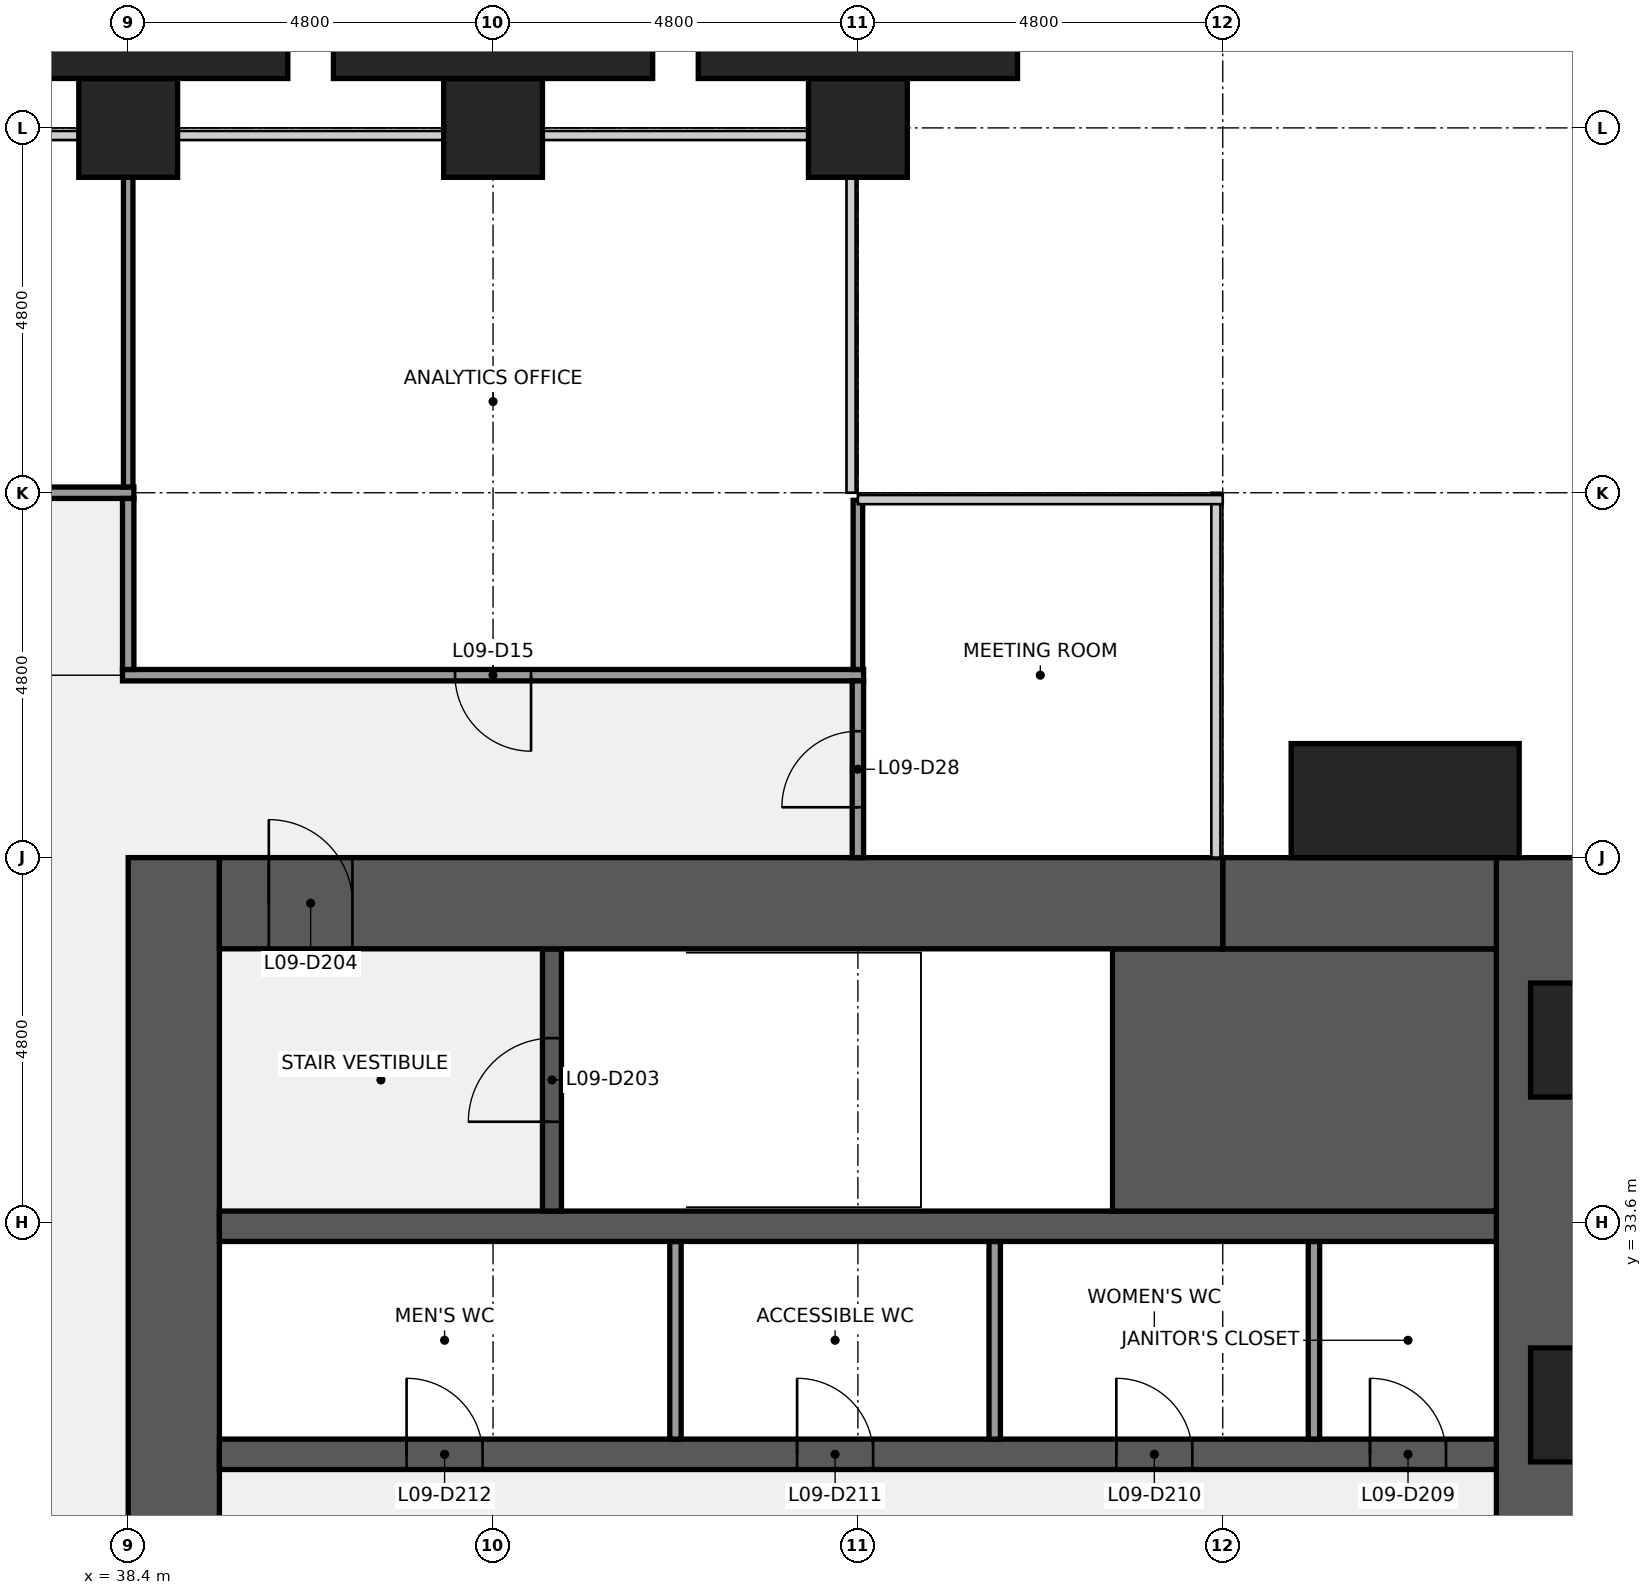
"""IFC4 building model, lengths in metres.
Left out: names, types, materials, properties, quantities, classifications, styles, units other than length and angle.
Written with IfcOpenShell. Run it as: python <this file> out.ifc"""

import sys

from ifc_helpers import new_model, si_unit, direction, frame, frame_2d, origin, origin_2d, place, context, subcontext, project, spatial, rectangle, extrude, element, fill, save


model = new_model("IFC4")
c1 = context("Model", 3, precision=1e-05, world=origin(), true_north=direction((0.0, 1.0)))
c2 = subcontext(c1, "Body", "Model", "MODEL_VIEW")
j1 = project(units=[si_unit("LENGTHUNIT", "METRE"), si_unit("PLANEANGLEUNIT", "RADIAN")], contexts=[c1])
p1 = place(None, origin())
s1 = spatial("IfcSite", under=j1, at=p1, CompositionType="ELEMENT")
p2 = place(p1, origin())
s2 = spatial("IfcBuilding", under=s1, at=p2, CompositionType="ELEMENT")
p3 = place(p2, frame((0.0, 0.0, 47.0)))
s3 = spatial("IfcBuildingStorey", under=s2, at=p3, CompositionType="ELEMENT", Elevation=47.0)
for number, where, z_axis, x_axis in (
    (1, (38.4, 48.0, 0.0), (0.0, 0.0, 1.0), (1.0, 0.0, 0.0)),
    (2, (43.2, 48.0, 0.0), (0.0, 0.0, 1.0), (1.0, 0.0, 0.0)),
    (3, (48.0, 48.0, 0.0), (0.0, 0.0, 1.0), (1.0, 0.0, 0.0)),
):
    element("IfcColumn", number, at=place(p3, frame(where, z_axis=z_axis, x_axis=x_axis)), inside=s3, PredefinedType="COLUMN", context=c2, shape_type="SweptSolid", body=[
        extrude(rectangle(XDim=1.3, YDim=1.3, at=origin_2d()), origin(), (0.0, 0.0, 1.0), 4.0),
    ])
p4 = place(p3, frame((57.0, 38.4, 0.0), z_axis=(0.0, 0.0, 1.0), x_axis=(0.0, -1.0, 0.0)))
e4 = element("IfcWall", 4, at=p4, inside=s3, PredefinedType="SHEAR", context=c2, shape_type="SweptSolid", body=[
    extrude(rectangle(XDim=28.8, YDim=1.2, at=frame_2d((14.4, 0.0))), origin(), (0.0, 0.0, 1.0), 3.84),
])
p5 = place(p4, frame((18.45, 0.0, 0.9)))
e5 = element("IfcOpeningElement", 5, at=p5, cuts=e4, PredefinedType="OPENING", context=c2, shape_type="SweptSolid", body=[
    extrude(rectangle(XDim=1.5, YDim=1.5, at=frame_2d((0.75, 0.75))), frame((0.0, 0.61, 0.0), z_axis=(0.0, -1.0, 0.0), x_axis=(1.0, 0.0, 0.0)), (0.0, 0.0, 1.0), 1.22),
])
p6 = place(p4, frame((8.85, 0.0, 0.9)))
e6 = element("IfcOpeningElement", 6, at=p6, cuts=e4, PredefinedType="OPENING", context=c2, shape_type="SweptSolid", body=[
    extrude(rectangle(XDim=1.5, YDim=1.5, at=frame_2d((0.75, 0.75))), frame((0.0, 0.61, 0.0), z_axis=(0.0, -1.0, 0.0), x_axis=(1.0, 0.0, 0.0)), (0.0, 0.0, 1.0), 1.22),
])
p7 = place(p3, frame((39.0, 9.6, 0.0), z_axis=(0.0, 0.0, 1.0), x_axis=(0.0, 1.0, 0.0)))
e7 = element("IfcWall", 7, at=p7, inside=s3, PredefinedType="SHEAR", context=c2, shape_type="SweptSolid", body=[
    extrude(rectangle(XDim=28.8, YDim=1.2, at=frame_2d((14.4, 0.0))), origin(), (0.0, 0.0, 1.0), 3.84),
])
p8 = place(p7, frame((8.7, 0.0, 0.0)))
e8 = element("IfcOpeningElement", 8, at=p8, cuts=e7, PredefinedType="OPENING", context=c2, shape_type="SweptSolid", body=[
    extrude(rectangle(XDim=1.8, YDim=2.1, at=frame_2d((0.9, 1.05))), frame((0.0, 0.61, 0.0), z_axis=(0.0, -1.0, 0.0), x_axis=(1.0, 0.0, 0.0)), (0.0, 0.0, 1.0), 1.22),
])
p9 = place(p7, frame((18.3, 0.0, 0.0)))
e9 = element("IfcOpeningElement", 9, at=p9, cuts=e7, PredefinedType="OPENING", context=c2, shape_type="SweptSolid", body=[
    extrude(rectangle(XDim=1.8, YDim=2.1, at=frame_2d((0.9, 1.05))), frame((0.0, 0.61, 0.0), z_axis=(0.0, -1.0, 0.0), x_axis=(1.0, 0.0, 0.0)), (0.0, 0.0, 1.0), 1.22),
])
p10 = place(p3, frame((39.6, 30.55, 0.0), z_axis=(0.0, 0.0, 1.0), x_axis=(1.0, 0.0, 0.0)))
e10 = element("IfcWall", 10, at=p10, inside=s3, PredefinedType="SHEAR", context=c2, shape_type="SweptSolid", body=[
    extrude(rectangle(XDim=16.8, YDim=0.4, at=frame_2d((8.4, 0.0))), origin(), (0.0, 0.0, 1.0), 3.84),
])
p11 = place(p10, frame((15.137, 0.0, 0.0)))
e11 = element("IfcOpeningElement", 11, at=p11, cuts=e10, PredefinedType="OPENING", context=c2, shape_type="SweptSolid", body=[
    extrude(rectangle(XDim=1.0, YDim=2.1, at=frame_2d((0.5, 1.05))), frame((0.0, 0.21, 0.0), z_axis=(0.0, -1.0, 0.0), x_axis=(1.0, 0.0, 0.0)), (0.0, 0.0, 1.0), 0.42),
])
p12 = place(p10, frame((11.8, 0.0, 0.0)))
e12 = element("IfcOpeningElement", 12, at=p12, cuts=e10, PredefinedType="OPENING", context=c2, shape_type="SweptSolid", body=[
    extrude(rectangle(XDim=1.0, YDim=2.1, at=frame_2d((0.5, 1.05))), frame((0.0, 0.21, 0.0), z_axis=(0.0, -1.0, 0.0), x_axis=(1.0, 0.0, 0.0)), (0.0, 0.0, 1.0), 0.42),
])
p13 = place(p10, frame((7.6, 0.0, 0.0)))
e13 = element("IfcOpeningElement", 13, at=p13, cuts=e10, PredefinedType="OPENING", context=c2, shape_type="SweptSolid", body=[
    extrude(rectangle(XDim=1.0, YDim=2.1, at=frame_2d((0.5, 1.05))), frame((0.0, 0.21, 0.0), z_axis=(0.0, -1.0, 0.0), x_axis=(1.0, 0.0, 0.0)), (0.0, 0.0, 1.0), 0.42),
])
p14 = place(p10, frame((2.462, 0.0, 0.0)))
e14 = element("IfcOpeningElement", 14, at=p14, cuts=e10, PredefinedType="OPENING", context=c2, shape_type="SweptSolid", body=[
    extrude(rectangle(XDim=1.0, YDim=2.1, at=frame_2d((0.5, 1.05))), frame((0.0, 0.21, 0.0), z_axis=(0.0, -1.0, 0.0), x_axis=(1.0, 0.0, 0.0)), (0.0, 0.0, 1.0), 0.42),
])
for number, where, z_axis, x_axis in (
    (15, (54.0, 30.75, 0.0), (0.0, 0.0, 1.0), (0.0, 1.0, 0.0)),
    (16, (49.8, 30.75, 0.0), (0.0, 0.0, 1.0), (0.0, 1.0, 0.0)),
    (17, (45.6, 30.75, 0.0), (0.0, 0.0, 1.0), (0.0, 1.0, 0.0)),
):
    element("IfcWall", number, at=place(p3, frame(where, z_axis=z_axis, x_axis=x_axis)), inside=s3, PredefinedType="PARTITIONING", context=c2, shape_type="SweptSolid", body=[
        extrude(rectangle(XDim=2.6, YDim=0.15, at=frame_2d((1.3, 0.0))), origin(), (0.0, 0.0, 1.0), 3.84),
    ])
p15 = place(p3, frame((39.6, 33.55, 0.0), z_axis=(0.0, 0.0, 1.0), x_axis=(1.0, 0.0, 0.0)))
e18 = element("IfcWall", 18, at=p15, inside=s3, PredefinedType="SHEAR", context=c2, shape_type="SweptSolid", body=[
    extrude(rectangle(XDim=16.8, YDim=0.4, at=frame_2d((8.4, 0.0))), origin(), (0.0, 0.0, 1.0), 3.84),
])
p16 = place(p3, frame((51.35, 35.475, 0.0), z_axis=(0.0, 0.0, 1.0), x_axis=(1.0, 0.0, 0.0)))
e19 = element("IfcWall", 19, at=p16, inside=s3, PredefinedType="SHEAR", context=c2, shape_type="SweptSolid", body=[
    extrude(rectangle(XDim=5.05, YDim=3.45, at=frame_2d((2.525, 0.0))), origin(), (0.0, 0.0, 1.0), 3.84),
])
p17 = place(p3, frame((43.975, 33.75, 0.0), z_axis=(0.0, 0.0, 1.0), x_axis=(0.0, 1.0, 0.0)))
e20 = element("IfcWall", 20, at=p17, inside=s3, PredefinedType="SHEAR", context=c2, shape_type="SweptSolid", body=[
    extrude(rectangle(XDim=3.45, YDim=0.25, at=frame_2d((1.725, 0.0))), origin(), (0.0, 0.0, 1.0), 3.84),
])
p18 = place(p17, frame((1.175, 0.0, 0.0)))
e21 = element("IfcOpeningElement", 21, at=p18, cuts=e20, PredefinedType="OPENING", context=c2, shape_type="SweptSolid", body=[
    extrude(rectangle(XDim=1.1, YDim=2.1, at=frame_2d((0.55, 1.05))), frame((0.0, 0.135, 0.0), z_axis=(0.0, -1.0, 0.0), x_axis=(1.0, 0.0, 0.0)), (0.0, 0.0, 1.0), 0.27),
])
p19 = place(p3, frame((52.8, 37.8, 0.0), z_axis=(0.0, 0.0, 1.0), x_axis=(1.0, 0.0, 0.0)))
e22 = element("IfcWall", 22, at=p19, inside=s3, PredefinedType="SHEAR", context=c2, shape_type="SweptSolid", body=[
    extrude(rectangle(XDim=3.6, YDim=1.2, at=frame_2d((1.8, 0.0))), origin(), (0.0, 0.0, 1.0), 3.84),
])
p20 = place(p3, frame((39.6, 37.8, 0.0), z_axis=(0.0, 0.0, 1.0), x_axis=(1.0, 0.0, 0.0)))
e23 = element("IfcWall", 23, at=p20, inside=s3, PredefinedType="SHEAR", context=c2, shape_type="SweptSolid", body=[
    extrude(rectangle(XDim=13.2, YDim=1.2, at=frame_2d((6.6, 0.0))), origin(), (0.0, 0.0, 1.0), 3.84),
])
p21 = place(p20, frame((0.65, 0.0, 0.0)))
e24 = element("IfcOpeningElement", 24, at=p21, cuts=e23, PredefinedType="OPENING", context=c2, shape_type="SweptSolid", body=[
    extrude(rectangle(XDim=1.1, YDim=2.1, at=frame_2d((0.55, 1.05))), frame((0.0, 0.61, 0.0), z_axis=(0.0, -1.0, 0.0), x_axis=(1.0, 0.0, 0.0)), (0.0, 0.0, 1.0), 1.22),
])
p22 = place(p3, frame((38.325, 40.8, 0.0), z_axis=(0.0, 0.0, 1.0), x_axis=(1.0, 0.0, 0.0)))
e25 = element("IfcWall", 25, at=p22, inside=s3, PredefinedType="PARTITIONING", context=c2, shape_type="SweptSolid", body=[
    extrude(rectangle(XDim=9.75, YDim=0.15, at=frame_2d((4.875, 0.0))), origin(), (0.0, 0.0, 1.0), 2.87),
])
p23 = place(p22, frame((4.375, 0.0, 0.0)))
e26 = element("IfcOpeningElement", 26, at=p23, cuts=e25, PredefinedType="OPENING", context=c2, shape_type="SweptSolid", body=[
    extrude(rectangle(XDim=1.0, YDim=2.1, at=frame_2d((0.5, 1.05))), frame((0.0, 0.085, 0.0), z_axis=(0.0, -1.0, 0.0), x_axis=(1.0, 0.0, 0.0)), (0.0, 0.0, 1.0), 0.17),
])
p24 = place(p3, frame((19.125, 43.2, 0.0), z_axis=(0.0, 0.0, 1.0), x_axis=(1.0, 0.0, 0.0)))
e27 = element("IfcWall", 27, at=p24, inside=s3, PredefinedType="PARTITIONING", context=c2, shape_type="SweptSolid", body=[
    extrude(rectangle(XDim=19.35, YDim=0.15, at=frame_2d((9.675, 0.0))), origin(), (0.0, 0.0, 1.0), 2.87),
])
p25 = place(p24, frame((0.775, 0.0, 0.0)))
e28 = element("IfcOpeningElement", 28, at=p25, cuts=e27, PredefinedType="OPENING", context=c2, shape_type="SweptSolid", body=[
    extrude(rectangle(XDim=1.0, YDim=2.1, at=frame_2d((0.5, 1.05))), frame((0.0, 0.085, 0.0), z_axis=(0.0, -1.0, 0.0), x_axis=(1.0, 0.0, 0.0)), (0.0, 0.0, 1.0), 0.17),
])
p26 = place(p24, frame((4.375, 0.0, 0.0)))
e29 = element("IfcOpeningElement", 29, at=p26, cuts=e27, PredefinedType="OPENING", context=c2, shape_type="SweptSolid", body=[
    extrude(rectangle(XDim=1.0, YDim=2.1, at=frame_2d((0.5, 1.05))), frame((0.0, 0.085, 0.0), z_axis=(0.0, -1.0, 0.0), x_axis=(1.0, 0.0, 0.0)), (0.0, 0.0, 1.0), 0.17),
])
p27 = place(p24, frame((7.975, 0.0, 0.0)))
e30 = element("IfcOpeningElement", 30, at=p27, cuts=e27, PredefinedType="OPENING", context=c2, shape_type="SweptSolid", body=[
    extrude(rectangle(XDim=1.0, YDim=2.1, at=frame_2d((0.5, 1.05))), frame((0.0, 0.085, 0.0), z_axis=(0.0, -1.0, 0.0), x_axis=(1.0, 0.0, 0.0)), (0.0, 0.0, 1.0), 0.17),
])
p28 = place(p24, frame((13.975, 0.0, 0.0)))
e31 = element("IfcOpeningElement", 31, at=p28, cuts=e27, PredefinedType="OPENING", context=c2, shape_type="SweptSolid", body=[
    extrude(rectangle(XDim=1.0, YDim=2.1, at=frame_2d((0.5, 1.05))), frame((0.0, 0.085, 0.0), z_axis=(0.0, -1.0, 0.0), x_axis=(1.0, 0.0, 0.0)), (0.0, 0.0, 1.0), 0.17),
])
p29 = place(p3, frame((38.4, 43.275, 0.0), z_axis=(0.0, 0.0, 1.0), x_axis=(0.0, 1.0, 0.0)))
e32 = element("IfcWall", 32, at=p29, inside=s3, PredefinedType="PARTITIONING", context=c2, shape_type="SweptSolid", body=[
    extrude(rectangle(XDim=4.075, YDim=0.125, at=frame_2d((2.038, 0.0))), origin(), (0.0, 0.0, 1.0), 2.87),
])
p30 = place(p3, frame((38.4, 40.875, 0.0), z_axis=(0.0, 0.0, 1.0), x_axis=(0.0, 1.0, 0.0)))
e33 = element("IfcWall", 33, at=p30, inside=s3, PredefinedType="PARTITIONING", context=c2, shape_type="SweptSolid", body=[
    extrude(rectangle(XDim=2.25, YDim=0.15, at=frame_2d((1.125, 0.0))), origin(), (0.0, 0.0, 1.0), 2.87),
])
p31 = place(p3, frame((48.0, 40.875, 0.0), z_axis=(0.0, 0.0, 1.0), x_axis=(0.0, 1.0, 0.0)))
e34 = element("IfcWall", 34, at=p31, inside=s3, PredefinedType="PARTITIONING", context=c2, shape_type="SweptSolid", body=[
    extrude(rectangle(XDim=2.225, YDim=0.125, at=frame_2d((1.113, 0.0))), origin(), (0.0, 0.0, 1.0), 2.87),
])
p32 = place(p3, frame((48.0, 38.4, 0.0), z_axis=(0.0, 0.0, 1.0), x_axis=(0.0, 1.0, 0.0)))
e35 = element("IfcWall", 35, at=p32, inside=s3, PredefinedType="PARTITIONING", context=c2, shape_type="SweptSolid", body=[
    extrude(rectangle(XDim=2.325, YDim=0.15, at=frame_2d((1.163, 0.0))), origin(), (0.0, 0.0, 1.0), 2.87),
])
p33 = place(p32, frame((0.663, 0.0, 0.0)))
e36 = element("IfcOpeningElement", 36, at=p33, cuts=e35, PredefinedType="OPENING", context=c2, shape_type="SweptSolid", body=[
    extrude(rectangle(XDim=1.0, YDim=2.1, at=frame_2d((0.5, 1.05))), frame((0.0, 0.085, 0.0), z_axis=(0.0, -1.0, 0.0), x_axis=(1.0, 0.0, 0.0)), (0.0, 0.0, 1.0), 0.17),
])
p34 = place(p3, frame((55.2, 39.15, 0.0), z_axis=(0.0, 0.0, 1.0), x_axis=(1.0, 0.0, 0.0)))
e37 = element("IfcColumn", 37, at=p34, inside=s3, PredefinedType="PILASTER", context=c2, shape_type="SweptSolid", body=[
    extrude(rectangle(XDim=3.0, YDim=1.5, at=origin_2d()), origin(), (0.0, 0.0, 1.0), 4.0),
])
for number, where, z_axis, x_axis in (
    (38, (38.4, 49.075, 0.0), (0.0, 0.0, 1.0), (1.0, 0.0, 0.0)),
    (39, (43.2, 49.075, 0.0), (0.0, 0.0, 1.0), (1.0, 0.0, 0.0)),
    (40, (48.0, 49.075, 0.0), (0.0, 0.0, 1.0), (1.0, 0.0, 0.0)),
):
    element("IfcColumn", number, at=place(p3, frame(where, z_axis=z_axis, x_axis=x_axis)), inside=s3, PredefinedType="PILASTER", context=c2, shape_type="SweptSolid", body=[
        extrude(rectangle(XDim=4.2, YDim=0.85, at=origin_2d()), origin(), (0.0, 0.0, 1.0), 4.0),
    ])
p35 = place(p18, origin())
e41 = element("IfcDoor", 41, at=p35, inside=s3, OperationType="SINGLE_SWING_LEFT", PredefinedType="DOOR", context=c2, shape_type="SweptSolid", body=[
    extrude(rectangle(XDim=1.1, YDim=2.1, at=frame_2d((0.55, 1.05))), frame((0.0, 0.025, 0.0), z_axis=(0.0, -1.0, 0.0), x_axis=(1.0, 0.0, 0.0)), (0.0, 0.0, 1.0), 0.05),
])
fill(e21, e41)
p36 = place(p21, origin())
e42 = element("IfcDoor", 42, at=p36, inside=s3, OperationType="SINGLE_SWING_LEFT", PredefinedType="DOOR", context=c2, shape_type="SweptSolid", body=[
    extrude(rectangle(XDim=1.1, YDim=2.1, at=frame_2d((0.55, 1.05))), frame((0.0, 0.025, 0.0), z_axis=(0.0, -1.0, 0.0), x_axis=(1.0, 0.0, 0.0)), (0.0, 0.0, 1.0), 0.05),
])
fill(e24, e42)
p37 = place(p11, origin())
e43 = element("IfcDoor", 43, at=p37, inside=s3, OperationType="SINGLE_SWING_LEFT", PredefinedType="DOOR", context=c2, shape_type="SweptSolid", body=[
    extrude(rectangle(XDim=1.0, YDim=2.1, at=frame_2d((0.5, 1.05))), frame((0.0, 0.025, 0.0), z_axis=(0.0, -1.0, 0.0), x_axis=(1.0, 0.0, 0.0)), (0.0, 0.0, 1.0), 0.05),
])
fill(e11, e43)
p38 = place(p12, origin())
e44 = element("IfcDoor", 44, at=p38, inside=s3, OperationType="SINGLE_SWING_LEFT", PredefinedType="DOOR", context=c2, shape_type="SweptSolid", body=[
    extrude(rectangle(XDim=1.0, YDim=2.1, at=frame_2d((0.5, 1.05))), frame((0.0, 0.025, 0.0), z_axis=(0.0, -1.0, 0.0), x_axis=(1.0, 0.0, 0.0)), (0.0, 0.0, 1.0), 0.05),
])
fill(e12, e44)
p39 = place(p13, origin())
e45 = element("IfcDoor", 45, at=p39, inside=s3, OperationType="SINGLE_SWING_LEFT", PredefinedType="DOOR", context=c2, shape_type="SweptSolid", body=[
    extrude(rectangle(XDim=1.0, YDim=2.1, at=frame_2d((0.5, 1.05))), frame((0.0, 0.025, 0.0), z_axis=(0.0, -1.0, 0.0), x_axis=(1.0, 0.0, 0.0)), (0.0, 0.0, 1.0), 0.05),
])
fill(e13, e45)
p40 = place(p14, origin())
e46 = element("IfcDoor", 46, at=p40, inside=s3, OperationType="SINGLE_SWING_LEFT", PredefinedType="DOOR", context=c2, shape_type="SweptSolid", body=[
    extrude(rectangle(XDim=1.0, YDim=2.1, at=frame_2d((0.5, 1.05))), frame((0.0, 0.025, 0.0), z_axis=(0.0, -1.0, 0.0), x_axis=(1.0, 0.0, 0.0)), (0.0, 0.0, 1.0), 0.05),
])
fill(e14, e46)
p41 = place(p23, origin())
e47 = element("IfcDoor", 47, at=p41, inside=s3, OperationType="SINGLE_SWING_RIGHT", PredefinedType="DOOR", context=c2, shape_type="SweptSolid", body=[
    extrude(rectangle(XDim=1.0, YDim=2.1, at=frame_2d((0.5, 1.05))), frame((0.0, 0.025, 0.0), z_axis=(0.0, -1.0, 0.0), x_axis=(1.0, 0.0, 0.0)), (0.0, 0.0, 1.0), 0.05),
])
fill(e26, e47)
p42 = place(p33, origin())
e48 = element("IfcDoor", 48, at=p42, inside=s3, OperationType="SINGLE_SWING_LEFT", PredefinedType="DOOR", context=c2, shape_type="SweptSolid", body=[
    extrude(rectangle(XDim=1.0, YDim=2.1, at=frame_2d((0.5, 1.05))), frame((0.0, 0.025, 0.0), z_axis=(0.0, -1.0, 0.0), x_axis=(1.0, 0.0, 0.0)), (0.0, 0.0, 1.0), 0.05),
])
fill(e36, e48)
save(model, sys.argv[1])
